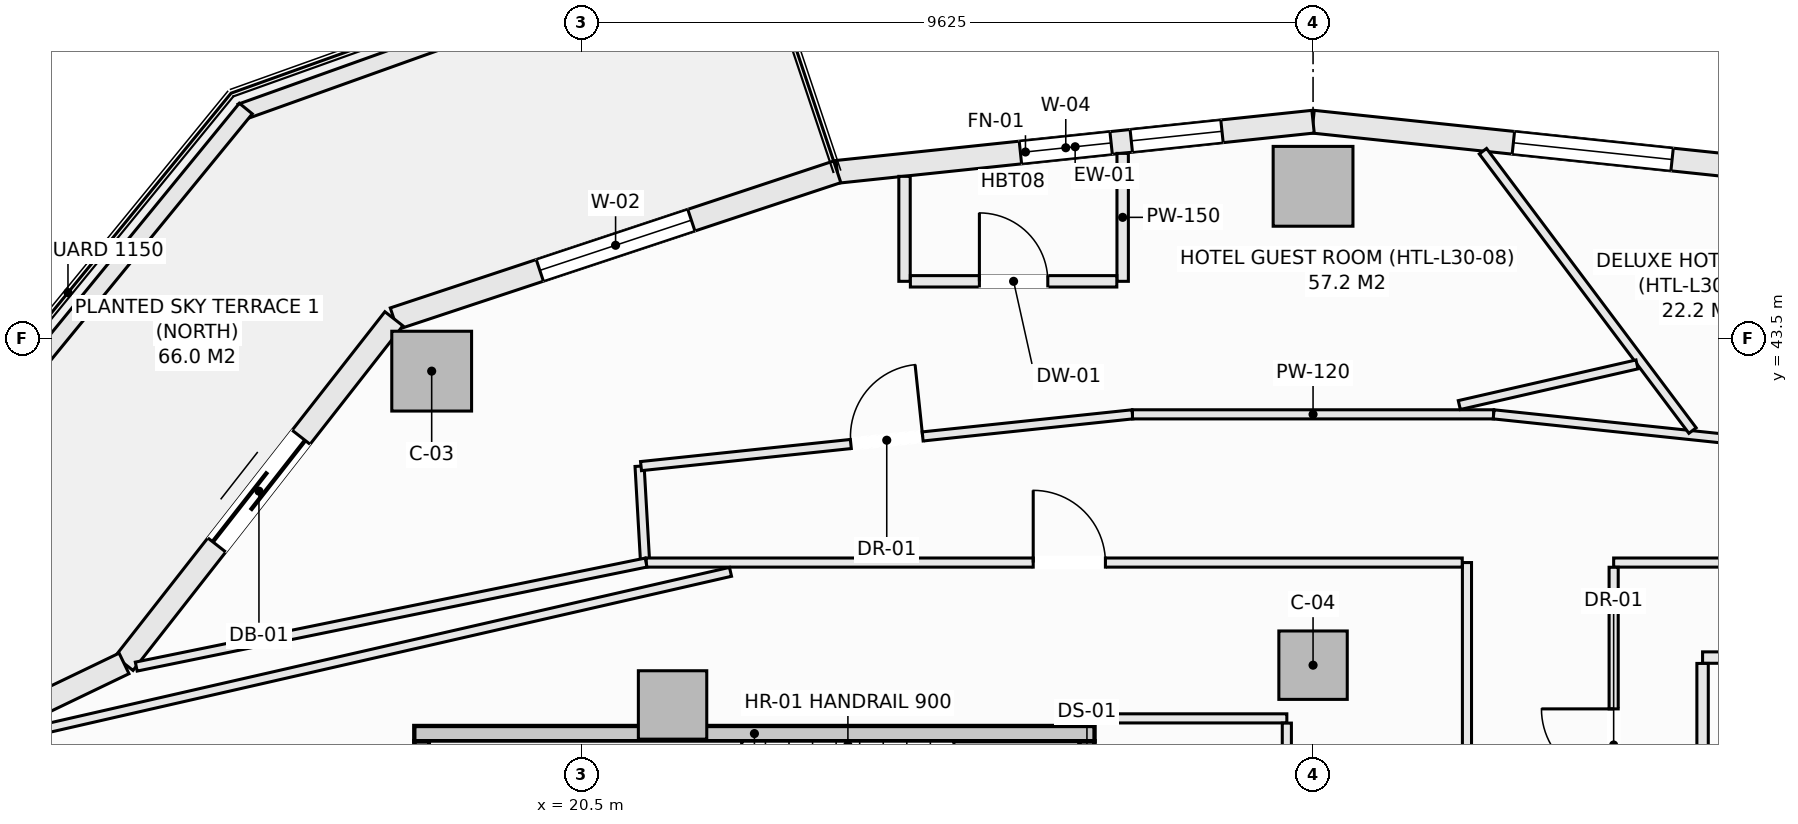
"""IFC4 building model, lengths in metres.
Left out: names, types, materials, properties, quantities, classifications, styles, units other than length and angle.
Written with IfcOpenShell. Run it as: python <this file> out.ifc"""

import sys

from ifc_helpers import new_model, si_unit, direction, frame, frame_2d, origin, origin_2d, place, context, subcontext, project, spatial, rectangle, extrude, element, fill, save


model = new_model("IFC4")
c1 = context("Model", 3, precision=1e-05, world=origin(), true_north=direction((0.0, 1.0)))
c2 = subcontext(c1, "Body", "Model", "MODEL_VIEW")
j1 = project(units=[si_unit("LENGTHUNIT", "METRE"), si_unit("PLANEANGLEUNIT", "RADIAN")], contexts=[c1])
p1 = place(None, origin())
s1 = spatial("IfcSite", under=j1, at=p1, CompositionType="ELEMENT")
p2 = place(p1, origin())
s2 = spatial("IfcBuilding", under=s1, at=p2, CompositionType="ELEMENT")
p3 = place(p2, frame((0.0, 0.0, 122.3)))
s3 = spatial("IfcBuildingStorey", under=s2, at=p3, CompositionType="ELEMENT", Elevation=122.3)
for number, where, z_axis, x_axis in (
    (1, (30.125, 45.5, -0.27), (0.0, 0.0, 1.0), (1.0, 0.0, 0.0)),
    (2, (18.529, 43.068, -0.27), (0.0, 0.0, 1.0), (1.0, 0.0, 0.0)),
):
    element("IfcColumn", number, at=place(p3, frame(where, z_axis=z_axis, x_axis=x_axis)), inside=s3, PredefinedType="COLUMN", context=c2, shape_type="SweptSolid", body=[
        extrude(rectangle(XDim=1.05, YDim=1.05, at=origin_2d()), origin(), (0.0, 0.0, 1.0), 3.4),
    ])
for number, where, z_axis, x_axis in (
    (3, (30.125, 39.2, -0.27), (0.0, 0.0, 1.0), (1.0, 0.0, 0.0)),
    (4, (21.698, 38.677, -0.27), (0.0, 0.0, 1.0), (1.0, 0.0, 0.0)),
):
    element("IfcColumn", number, at=place(p3, frame(where, z_axis=z_axis, x_axis=x_axis)), inside=s3, PredefinedType="COLUMN", context=c2, shape_type="SweptSolid", body=[
        extrude(rectangle(XDim=0.9, YDim=0.9, at=origin_2d()), origin(), (0.0, 0.0, 1.0), 3.4),
    ])
p4 = place(p3, frame((30.125, 46.35, 0.0), z_axis=(0.0, 0.0, 1.0), x_axis=(0.994498012394, -0.104755445421, 0.0)))
e5 = element("IfcWall", 5, at=p4, inside=s3, PredefinedType="SOLIDWALL", context=c2, shape_type="SweptSolid", body=[
    extrude(rectangle(XDim=6.295, YDim=0.3, at=frame_2d((3.147, 0.0))), origin(), (0.0, 0.0, 1.0), 2.653),
])
p5 = place(p4, frame((2.65, 0.0, 0.74)))
e6 = element("IfcOpeningElement", 6, at=p5, cuts=e5, PredefinedType="OPENING", context=c2, shape_type="SweptSolid", body=[
    extrude(rectangle(XDim=2.1, YDim=1.7, at=frame_2d((1.05, 0.85))), frame((0.0, 0.16, 0.0), z_axis=(0.0, -1.0, 0.0), x_axis=(1.0, 0.0, 0.0)), (0.0, 0.0, 1.0), 0.32),
])
p6 = place(p3, frame((23.865, 45.691, 0.0), z_axis=(0.0, 0.0, 1.0), x_axis=(0.994498012394, 0.104755445421, 0.0)))
e7 = element("IfcWall", 7, at=p6, inside=s3, PredefinedType="SOLIDWALL", context=c2, shape_type="SweptSolid", body=[
    extrude(rectangle(XDim=6.295, YDim=0.3, at=frame_2d((3.147, 0.0))), origin(), (0.0, 0.0, 1.0), 2.653),
])
p7 = place(p6, frame((2.423, 0.0, 0.74)))
e8 = element("IfcOpeningElement", 8, at=p7, cuts=e7, PredefinedType="OPENING", context=c2, shape_type="SweptSolid", body=[
    extrude(rectangle(XDim=1.2, YDim=1.7, at=frame_2d((0.6, 0.85))), frame((0.0, 0.16, 0.0), z_axis=(0.0, -1.0, 0.0), x_axis=(1.0, 0.0, 0.0)), (0.0, 0.0, 1.0), 0.32),
])
p8 = place(p6, frame((3.89, 0.0, 0.74)))
e9 = element("IfcOpeningElement", 9, at=p8, cuts=e7, PredefinedType="OPENING", context=c2, shape_type="SweptSolid", body=[
    extrude(rectangle(XDim=1.2, YDim=1.7, at=frame_2d((0.6, 0.85))), frame((0.0, 0.16, 0.0), z_axis=(0.0, -1.0, 0.0), x_axis=(1.0, 0.0, 0.0)), (0.0, 0.0, 1.0), 0.32),
])
p9 = place(p3, frame((18.031, 43.758, 0.0), z_axis=(0.0, 0.0, 1.0), x_axis=(0.949238009374, 0.314558741032, 0.0)))
e10 = element("IfcWall", 10, at=p9, inside=s3, PredefinedType="SOLIDWALL", context=c2, shape_type="SweptSolid", body=[
    extrude(rectangle(XDim=6.146, YDim=0.3, at=frame_2d((3.073, 0.0))), origin(), (0.0, 0.0, 1.0), 2.653),
])
p10 = place(p9, frame((2.023, 0.0, 0.74)))
e11 = element("IfcOpeningElement", 11, at=p10, cuts=e10, PredefinedType="OPENING", context=c2, shape_type="SweptSolid", body=[
    extrude(rectangle(XDim=2.1, YDim=1.7, at=frame_2d((1.05, 0.85))), frame((0.0, 0.16, 0.0), z_axis=(0.0, -1.0, 0.0), x_axis=(1.0, 0.0, 0.0)), (0.0, 0.0, 1.0), 0.32),
])
p11 = place(p3, frame((14.481, 39.223, 0.0), z_axis=(0.0, 0.0, 1.0), x_axis=(0.616435134162, 0.787405693001, 0.0)))
e12 = element("IfcWall", 12, at=p11, inside=s3, PredefinedType="SOLIDWALL", context=c2, shape_type="SweptSolid", body=[
    extrude(rectangle(XDim=5.759, YDim=0.3, at=frame_2d((2.879, 0.0))), origin(), (0.0, 0.0, 1.0), 2.653),
])
p12 = place(p11, frame((1.979, 0.0, 0.0)))
e13 = element("IfcOpeningElement", 13, at=p12, cuts=e12, PredefinedType="OPENING", context=c2, shape_type="SweptSolid", body=[
    extrude(rectangle(XDim=1.8, YDim=2.25, at=frame_2d((0.9, 1.125))), frame((0.0, 0.16, 0.0), z_axis=(0.0, -1.0, 0.0), x_axis=(1.0, 0.0, 0.0)), (0.0, 0.0, 1.0), 0.32),
])
p13 = place(p3, frame((9.178, 36.675, 0.0), z_axis=(0.0, 0.0, 1.0), x_axis=(0.901370184739, 0.433049408339, 0.0)))
e14 = element("IfcWall", 14, at=p13, inside=s3, PredefinedType="SOLIDWALL", context=c2, shape_type="SweptSolid", body=[
    extrude(rectangle(XDim=5.884, YDim=0.3, at=frame_2d((2.942, 0.0))), origin(), (0.0, 0.0, 1.0), 2.653),
])
p14 = place(p13, frame((1.892, 0.0, 0.74)))
e15 = element("IfcOpeningElement", 15, at=p14, cuts=e14, PredefinedType="OPENING", context=c2, shape_type="SweptSolid", body=[
    extrude(rectangle(XDim=2.1, YDim=1.7, at=frame_2d((1.05, 0.85))), frame((0.0, 0.16, 0.0), z_axis=(0.0, -1.0, 0.0), x_axis=(1.0, 0.0, 0.0)), (0.0, 0.0, 1.0), 0.32),
])
p15 = place(p3, frame((16.018, 46.477, 0.0), z_axis=(0.0, 0.0, 1.0), x_axis=(0.941628873241, 0.336652736627, 0.0)))
e16 = element("IfcWall", 16, at=p15, inside=s3, PredefinedType="PARAPET", context=c2, shape_type="SweptSolid", body=[
    extrude(rectangle(XDim=7.235, YDim=0.22, at=frame_2d((3.618, 0.0))), origin(), (0.0, 0.0, 1.0), 0.52),
])
p16 = place(p3, frame((11.791, 41.274, 0.0), z_axis=(0.0, 0.0, 1.0), x_axis=(0.633024046468, 0.774132131224, 0.0)))
e17 = element("IfcWall", 17, at=p16, inside=s3, PredefinedType="PARAPET", context=c2, shape_type="SweptSolid", body=[
    extrude(rectangle(XDim=6.781, YDim=0.22, at=frame_2d((3.39, 0.0))), origin(), (0.0, 0.0, 1.0), 0.52),
])
p17 = place(p3, frame((27.15, 35.16, -0.27), z_axis=(0.0, 0.0, 1.0), x_axis=(0.0, 1.0, 0.0)))
e18 = element("IfcWall", 18, at=p17, inside=s3, PredefinedType="SHEAR", context=c2, shape_type="SweptSolid", body=[
    extrude(rectangle(XDim=3.04, YDim=0.2, at=frame_2d((1.52, 0.0))), origin(), (0.0, 0.0, 1.0), 3.4),
])
p18 = place(p17, frame((0.97, 0.0, 0.27)))
e19 = element("IfcOpeningElement", 19, at=p18, cuts=e18, PredefinedType="OPENING", context=c2, shape_type="SweptSolid", body=[
    extrude(rectangle(XDim=1.1, YDim=2.15, at=frame_2d((0.55, 1.075))), frame((0.0, 0.11, 0.0), z_axis=(0.0, -1.0, 0.0), x_axis=(1.0, 0.0, 0.0)), (0.0, 0.0, 1.0), 0.22),
])
p19 = place(p3, frame((18.4, 35.16, -0.27), z_axis=(0.0, 0.0, 1.0), x_axis=(0.0, 1.0, 0.0)))
e20 = element("IfcWall", 20, at=p19, inside=s3, PredefinedType="SHEAR", context=c2, shape_type="SweptSolid", body=[
    extrude(rectangle(XDim=3.04, YDim=0.2, at=frame_2d((1.52, 0.0))), origin(), (0.0, 0.0, 1.0), 3.4),
])
p20 = place(p3, frame((18.3, 38.3, -0.27), z_axis=(0.0, 0.0, 1.0), x_axis=(1.0, 0.0, 0.0)))
e21 = element("IfcWall", 21, at=p20, inside=s3, PredefinedType="SHEAR", context=c2, shape_type="SweptSolid", body=[
    extrude(rectangle(XDim=8.95, YDim=0.2, at=frame_2d((4.475, 0.0))), origin(), (0.0, 0.0, 1.0), 3.4),
])
p21 = place(p3, frame((27.62, 44.25, 0.0), z_axis=(0.0, 0.0, 1.0), x_axis=(0.0, 1.0, 0.0)))
e22 = element("IfcWall", 22, at=p21, inside=s3, PredefinedType="PARTITIONING", context=c2, shape_type="SweptSolid", body=[
    extrude(rectangle(XDim=1.683, YDim=0.15, at=frame_2d((0.842, 0.0))), origin(), (0.0, 0.0, 1.0), 3.13),
])
p22 = place(p3, frame((21.264, 41.818, 0.0), z_axis=(0.0, 0.0, 1.0), x_axis=(0.0574492264, -0.99834842935, 0.0)))
e23 = element("IfcWall", 23, at=p22, inside=s3, PredefinedType="PARTITIONING", context=c2, shape_type="SweptSolid", body=[
    extrude(rectangle(XDim=1.271, YDim=0.12, at=frame_2d((0.635, 0.0))), origin(), (0.0, 0.0, 1.0), 3.13),
])
p23 = place(p3, frame((27.25, 38.5, 0.0), z_axis=(0.0, 0.0, 1.0), x_axis=(1.0, 0.0, 0.0)))
e24 = element("IfcWall", 24, at=p23, inside=s3, PredefinedType="PARTITIONING", context=c2, shape_type="SweptSolid", body=[
    extrude(rectangle(XDim=2.53, YDim=0.12, at=frame_2d((1.265, 0.0))), origin(), (0.0, 0.0, 1.0), 3.13),
])
p24 = place(p3, frame((29.78, 35.75, 0.0), z_axis=(0.0, 0.0, 1.0), x_axis=(0.0, 1.0, 0.0)))
e25 = element("IfcWall", 25, at=p24, inside=s3, PredefinedType="PARTITIONING", context=c2, shape_type="SweptSolid", body=[
    extrude(rectangle(XDim=2.688, YDim=0.12, at=frame_2d((1.344, 0.0))), origin(), (0.0, 0.0, 1.0), 3.13),
])
p25 = place(p3, frame((32.15, 35.812, 0.0), z_axis=(0.0, 0.0, 1.0), x_axis=(0.0, 1.0, 0.0)))
e26 = element("IfcWall", 26, at=p25, inside=s3, PredefinedType="PARTITIONING", context=c2, shape_type="SweptSolid", body=[
    extrude(rectangle(XDim=4.738, YDim=0.12, at=frame_2d((2.369, 0.0))), origin(), (0.0, 0.0, 1.0), 3.13),
])
p26 = place(p3, frame((21.351, 40.55, 0.0), z_axis=(0.0, 0.0, 1.0), x_axis=(1.0, 0.0, 0.0)))
e27 = element("IfcWall", 27, at=p26, inside=s3, PredefinedType="PARTITIONING", context=c2, shape_type="SweptSolid", body=[
    extrude(rectangle(XDim=10.737, YDim=0.12, at=frame_2d((5.369, 0.0))), origin(), (0.0, 0.0, 1.0), 3.13),
])
p27 = place(p26, frame((5.092, 0.0, 0.0)))
e28 = element("IfcOpeningElement", 28, at=p27, cuts=e27, PredefinedType="OPENING", context=c2, shape_type="SweptSolid", body=[
    extrude(rectangle(XDim=0.95, YDim=2.1, at=frame_2d((0.475, 1.05))), frame((0.0, 0.07, 0.0), z_axis=(0.0, -1.0, 0.0), x_axis=(1.0, 0.0, 0.0)), (0.0, 0.0, 1.0), 0.14),
])
p28 = place(p3, frame((34.08, 40.55, 0.0), z_axis=(0.0, 0.0, 1.0), x_axis=(1.0, 0.0, 0.0)))
e29 = element("IfcWall", 29, at=p28, inside=s3, PredefinedType="PARTITIONING", context=c2, shape_type="SweptSolid", body=[
    extrude(rectangle(XDim=4.82, YDim=0.12, at=frame_2d((2.41, 0.0))), origin(), (0.0, 0.0, 1.0), 3.13),
])
p29 = place(p28, frame((3.291, 0.0, 0.0)))
e30 = element("IfcOpeningElement", 30, at=p29, cuts=e29, PredefinedType="OPENING", context=c2, shape_type="SweptSolid", body=[
    extrude(rectangle(XDim=0.95, YDim=2.1, at=frame_2d((0.475, 1.05))), frame((0.0, 0.07, 0.0), z_axis=(0.0, -1.0, 0.0), x_axis=(1.0, 0.0, 0.0)), (0.0, 0.0, 1.0), 0.14),
])
p30 = place(p3, frame((21.283, 41.819, 0.0), z_axis=(0.0, 0.0, 1.0), x_axis=(0.994501131299, 0.104725831799, 0.0)))
e31 = element("IfcWall", 31, at=p30, inside=s3, PredefinedType="PARTITIONING", context=c2, shape_type="SweptSolid", body=[
    extrude(rectangle(XDim=6.502, YDim=0.12, at=frame_2d((3.251, 0.0))), origin(), (0.0, 0.0, 1.0), 3.13),
])
p31 = place(p30, frame((2.776, 0.0, 0.0)))
e32 = element("IfcOpeningElement", 32, at=p31, cuts=e31, PredefinedType="OPENING", context=c2, shape_type="SweptSolid", body=[
    extrude(rectangle(XDim=0.95, YDim=2.1, at=frame_2d((0.475, 1.05))), frame((0.0, 0.07, 0.0), z_axis=(0.0, -1.0, 0.0), x_axis=(1.0, 0.0, 0.0)), (0.0, 0.0, 1.0), 0.14),
])
p32 = place(p3, frame((27.749, 42.5, 0.0), z_axis=(0.0, 0.0, 1.0), x_axis=(1.0, 0.0, 0.0)))
e33 = element("IfcWall", 33, at=p32, inside=s3, PredefinedType="PARTITIONING", context=c2, shape_type="SweptSolid", body=[
    extrude(rectangle(XDim=4.752, YDim=0.12, at=frame_2d((2.376, 0.0))), origin(), (0.0, 0.0, 1.0), 3.13),
])
p33 = place(p3, frame((32.501, 42.5, 0.0), z_axis=(0.0, 0.0, 1.0), x_axis=(0.994501131299, -0.104725831799, 0.0)))
e34 = element("IfcWall", 34, at=p33, inside=s3, PredefinedType="PARTITIONING", context=c2, shape_type="SweptSolid", body=[
    extrude(rectangle(XDim=6.502, YDim=0.12, at=frame_2d((3.251, 0.0))), origin(), (0.0, 0.0, 1.0), 3.13),
])
p34 = place(p33, frame((3.868, 0.0, 0.0)))
e35 = element("IfcOpeningElement", 35, at=p34, cuts=e34, PredefinedType="OPENING", context=c2, shape_type="SweptSolid", body=[
    extrude(rectangle(XDim=0.95, YDim=2.1, at=frame_2d((0.475, 1.05))), frame((0.0, 0.07, 0.0), z_axis=(0.0, -1.0, 0.0), x_axis=(1.0, 0.0, 0.0)), (0.0, 0.0, 1.0), 0.14),
])
p35 = place(p3, frame((34.08, 35.812, 0.0), z_axis=(0.0, 0.0, 1.0), x_axis=(0.0, 1.0, 0.0)))
e36 = element("IfcWall", 36, at=p35, inside=s3, PredefinedType="PARTITIONING", context=c2, shape_type="SweptSolid", body=[
    extrude(rectangle(XDim=4.676, YDim=0.12, at=frame_2d((2.338, 0.0))), origin(), (0.0, 0.0, 1.0), 2.812),
])
p36 = place(p35, frame((1.863, 0.0, 0.0)))
e37 = element("IfcOpeningElement", 37, at=p36, cuts=e36, PredefinedType="OPENING", context=c2, shape_type="SweptSolid", body=[
    extrude(rectangle(XDim=0.95, YDim=2.1, at=frame_2d((0.475, 1.05))), frame((0.0, 0.07, 0.0), z_axis=(0.0, -1.0, 0.0), x_axis=(1.0, 0.0, 0.0)), (0.0, 0.0, 1.0), 0.14),
])
p37 = place(p3, frame((32.36, 45.962, 0.0), z_axis=(0.0, 0.0, 1.0), x_axis=(0.600221002096, -0.799834200721, 0.0)))
e38 = element("IfcWall", 38, at=p37, inside=s3, PredefinedType="PARTITIONING", context=c2, shape_type="SweptSolid", body=[
    extrude(rectangle(XDim=4.595, YDim=0.12, at=frame_2d((2.297, 0.0))), origin(), (0.0, 0.0, 1.0), 3.13),
])
p38 = place(p3, frame((35.25, 39.3, 0.0), z_axis=(0.0, 0.0, 1.0), x_axis=(1.0, 0.0, 0.0)))
e39 = element("IfcWall", 39, at=p38, inside=s3, PredefinedType="PARTITIONING", context=c2, shape_type="SweptSolid", body=[
    extrude(rectangle(XDim=2.013, YDim=0.15, at=frame_2d((1.006, 0.0))), origin(), (0.0, 0.0, 1.0), 3.13),
])
p39 = place(p3, frame((35.25, 36.75, 0.0), z_axis=(0.0, 0.0, 1.0), x_axis=(0.0, 1.0, 0.0)))
e40 = element("IfcWall", 40, at=p39, inside=s3, PredefinedType="PARTITIONING", context=c2, shape_type="SweptSolid", body=[
    extrude(rectangle(XDim=2.473, YDim=0.15, at=frame_2d((1.236, 0.0))), origin(), (0.0, 0.0, 1.0), 3.13),
])
p40 = place(p3, frame((24.75, 44.25, 0.0), z_axis=(0.0, 0.0, 1.0), x_axis=(0.0, 1.0, 0.0)))
e41 = element("IfcWall", 41, at=p40, inside=s3, PredefinedType="PARTITIONING", context=c2, shape_type="SweptSolid", body=[
    extrude(rectangle(XDim=1.381, YDim=0.15, at=frame_2d((0.69, 0.0))), origin(), (0.0, 0.0, 1.0), 3.13),
])
p41 = place(p3, frame((24.827, 44.25, 0.0), z_axis=(0.0, 0.0, 1.0), x_axis=(1.0, 0.0, 0.0)))
e42 = element("IfcWall", 42, at=p41, inside=s3, PredefinedType="PARTITIONING", context=c2, shape_type="SweptSolid", body=[
    extrude(rectangle(XDim=2.716, YDim=0.15, at=frame_2d((1.358, 0.0))), origin(), (0.0, 0.0, 1.0), 2.653),
])
p42 = place(p41, frame((0.908, 0.0, 0.0)))
e43 = element("IfcOpeningElement", 43, at=p42, cuts=e42, PredefinedType="OPENING", context=c2, shape_type="SweptSolid", body=[
    extrude(rectangle(XDim=0.9, YDim=2.1, at=frame_2d((0.45, 1.05))), frame((0.0, 0.085, 0.0), z_axis=(0.0, -1.0, 0.0), x_axis=(1.0, 0.0, 0.0)), (0.0, 0.0, 1.0), 0.17),
])
p43 = place(p3, frame((12.95, 38.252, 0.0), z_axis=(0.0, 0.0, 1.0), x_axis=(0.974810805883, 0.223033389281, 0.0)))
e44 = element("IfcWall", 44, at=p43, inside=s3, PredefinedType="PARTITIONING", context=c2, shape_type="SweptSolid", body=[
    extrude(rectangle(XDim=9.757, YDim=0.12, at=frame_2d((4.878, 0.0))), origin(), (0.0, 0.0, 1.0), 3.13),
])
p44 = place(p3, frame((32.049, 42.622, 0.0), z_axis=(0.0, 0.0, 1.0), x_axis=(0.974809835499, 0.223037630491, 0.0)))
e45 = element("IfcWall", 45, at=p44, inside=s3, PredefinedType="PARTITIONING", context=c2, shape_type="SweptSolid", body=[
    extrude(rectangle(XDim=2.398, YDim=0.12, at=frame_2d((1.199, 0.0))), origin(), (0.0, 0.0, 1.0), 3.13),
])
p45 = place(p3, frame((14.642, 39.181, 0.0), z_axis=(0.0, 0.0, 1.0), x_axis=(0.979813468357, 0.199913899534, 0.0)))
e46 = element("IfcWall", 46, at=p45, inside=s3, PredefinedType="PARTITIONING", context=c2, shape_type="SweptSolid", body=[
    extrude(rectangle(XDim=6.846, YDim=0.12, at=frame_2d((3.423, 0.0))), origin(), (0.0, 0.0, 1.0), 3.13),
])
p46 = place(p5, origin())
e47 = element("IfcWindow", 47, at=p46, inside=s3, PartitioningType="SINGLE_PANEL", PredefinedType="WINDOW", context=c2, shape_type="SweptSolid", body=[
    extrude(rectangle(XDim=2.1, YDim=1.7, at=frame_2d((1.05, 0.85))), frame((0.0, 0.03, 0.0), z_axis=(0.0, -1.0, 0.0), x_axis=(1.0, 0.0, 0.0)), (0.0, 0.0, 1.0), 0.06),
])
fill(e6, e47)
p47 = place(p7, origin())
e48 = element("IfcWindow", 48, at=p47, inside=s3, PartitioningType="SINGLE_PANEL", PredefinedType="WINDOW", context=c2, shape_type="SweptSolid", body=[
    extrude(rectangle(XDim=1.2, YDim=1.7, at=frame_2d((0.6, 0.85))), frame((0.0, 0.03, 0.0), z_axis=(0.0, -1.0, 0.0), x_axis=(1.0, 0.0, 0.0)), (0.0, 0.0, 1.0), 0.06),
])
fill(e8, e48)
p48 = place(p10, origin())
e49 = element("IfcWindow", 49, at=p48, inside=s3, PartitioningType="SINGLE_PANEL", PredefinedType="WINDOW", context=c2, shape_type="SweptSolid", body=[
    extrude(rectangle(XDim=2.1, YDim=1.7, at=frame_2d((1.05, 0.85))), frame((0.0, 0.03, 0.0), z_axis=(0.0, -1.0, 0.0), x_axis=(1.0, 0.0, 0.0)), (0.0, 0.0, 1.0), 0.06),
])
fill(e11, e49)
p49 = place(p12, origin())
e50 = element("IfcDoor", 50, at=p49, inside=s3, OperationType="SLIDING_TO_LEFT", PredefinedType="DOOR", context=c2, shape_type="SweptSolid", body=[
    extrude(rectangle(XDim=1.8, YDim=2.25, at=frame_2d((0.9, 1.125))), frame((0.0, 0.025, 0.0), z_axis=(0.0, -1.0, 0.0), x_axis=(1.0, 0.0, 0.0)), (0.0, 0.0, 1.0), 0.05),
])
fill(e13, e50)
p50 = place(p36, origin())
e51 = element("IfcDoor", 51, at=p50, inside=s3, OperationType="SINGLE_SWING_RIGHT", PredefinedType="DOOR", context=c2, shape_type="SweptSolid", body=[
    extrude(rectangle(XDim=0.95, YDim=2.1, at=frame_2d((0.475, 1.05))), frame((0.0, 0.025, 0.0), z_axis=(0.0, -1.0, 0.0), x_axis=(1.0, 0.0, 0.0)), (0.0, 0.0, 1.0), 0.05),
])
fill(e37, e51)
p51 = place(p31, origin())
e52 = element("IfcDoor", 52, at=p51, inside=s3, OperationType="SINGLE_SWING_RIGHT", PredefinedType="DOOR", context=c2, shape_type="SweptSolid", body=[
    extrude(rectangle(XDim=0.95, YDim=2.1, at=frame_2d((0.475, 1.05))), frame((0.0, 0.025, 0.0), z_axis=(0.0, -1.0, 0.0), x_axis=(1.0, 0.0, 0.0)), (0.0, 0.0, 1.0), 0.05),
])
fill(e32, e52)
p52 = place(p27, origin())
e53 = element("IfcDoor", 53, at=p52, inside=s3, OperationType="SINGLE_SWING_LEFT", PredefinedType="DOOR", context=c2, shape_type="SweptSolid", body=[
    extrude(rectangle(XDim=0.95, YDim=2.1, at=frame_2d((0.475, 1.05))), frame((0.0, 0.025, 0.0), z_axis=(0.0, -1.0, 0.0), x_axis=(1.0, 0.0, 0.0)), (0.0, 0.0, 1.0), 0.05),
])
fill(e28, e53)
p53 = place(p42, origin())
e54 = element("IfcDoor", 54, at=p53, inside=s3, OperationType="SINGLE_SWING_LEFT", PredefinedType="DOOR", context=c2, shape_type="SweptSolid", body=[
    extrude(rectangle(XDim=0.9, YDim=2.1, at=frame_2d((0.45, 1.05))), frame((0.0, 0.025, 0.0), z_axis=(0.0, -1.0, 0.0), x_axis=(1.0, 0.0, 0.0)), (0.0, 0.0, 1.0), 0.05),
])
fill(e43, e54)
p54 = place(p8, origin())
e55 = element("IfcWindow", 55, at=p54, inside=s3, PartitioningType="SINGLE_PANEL", PredefinedType="WINDOW", context=c2, shape_type="SweptSolid", body=[
    extrude(rectangle(XDim=1.2, YDim=1.7, at=frame_2d((0.6, 0.85))), frame((0.0, 0.03, 0.0), z_axis=(0.0, -1.0, 0.0), x_axis=(1.0, 0.0, 0.0)), (0.0, 0.0, 1.0), 0.06),
])
fill(e9, e55)
save(model, sys.argv[1])
